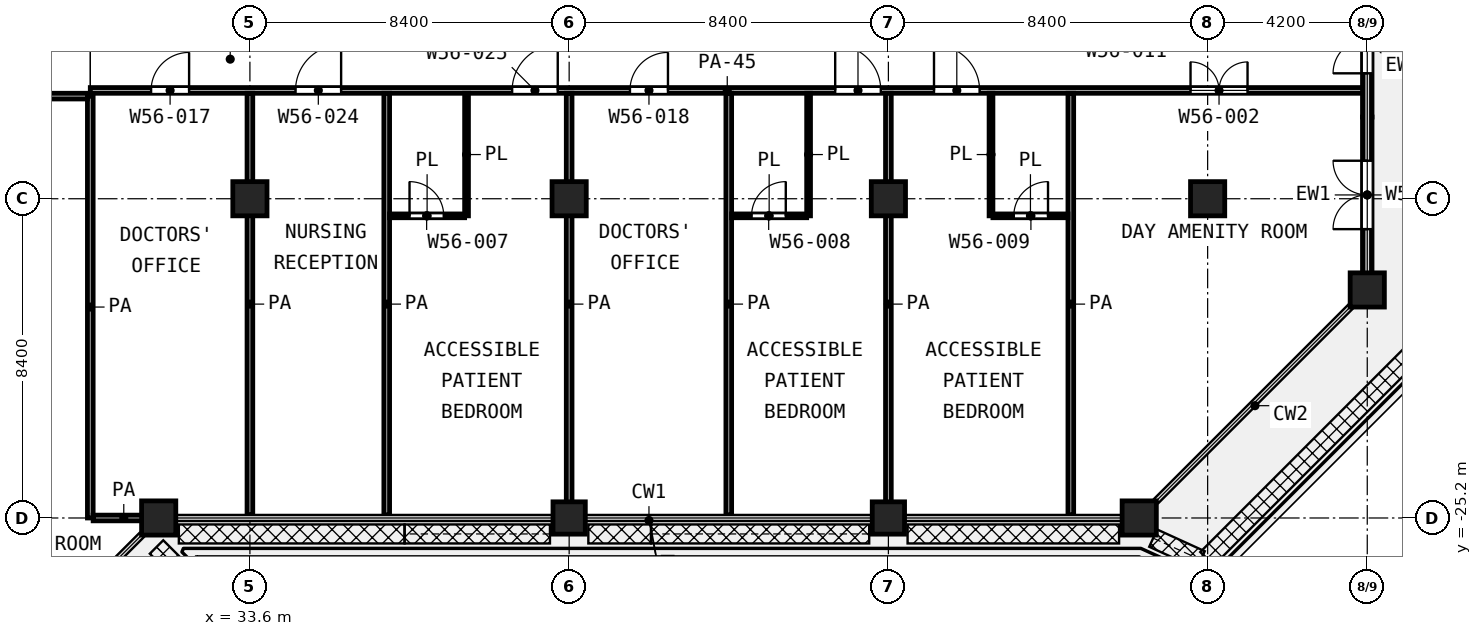
"""IFC4 building model, lengths in metres.
Left out: names, types, materials, properties, quantities, classifications, styles, units other than length and angle.
Written with IfcOpenShell. Run it as: python <this file> out.ifc"""

import sys

from ifc_helpers import new_model, si_unit, direction, frame, frame_2d, origin, origin_2d, place, context, subcontext, project, spatial, rectangle, extrude, element, fill, save


model = new_model("IFC4")
c1 = context("Model", 3, precision=1e-05, world=origin(), true_north=direction((0.0, 1.0)))
c2 = subcontext(c1, "Body", "Model", "MODEL_VIEW")
j1 = project(units=[si_unit("LENGTHUNIT", "METRE"), si_unit("PLANEANGLEUNIT", "RADIAN")], contexts=[c1])
p1 = place(None, origin())
s1 = spatial("IfcSite", under=j1, at=p1, CompositionType="ELEMENT")
p2 = place(p1, origin())
s2 = spatial("IfcBuilding", under=s1, at=p2, CompositionType="ELEMENT")
p3 = place(p2, frame((0.0, 0.0, 243.2)))
s3 = spatial("IfcBuildingStorey", under=s2, at=p3, CompositionType="ELEMENT", Elevation=243.2)
for number, where, z_axis, x_axis in (
    (1, (33.6, -16.8, 0.0), (0.0, 0.0, 1.0), (1.0, 0.0, 0.0)),
    (2, (42.0, -16.8, 0.0), (0.0, 0.0, 1.0), (1.0, 0.0, 0.0)),
    (3, (50.4, -16.8, 0.0), (0.0, 0.0, 1.0), (1.0, 0.0, 0.0)),
    (4, (58.8, -16.8, 0.0), (0.0, 0.0, 1.0), (1.0, 0.0, 0.0)),
    (5, (63.0, -19.2, 0.0), (0.0, 0.0, 1.0), (1.0, 0.0, 0.0)),
    (6, (31.2, -25.2, 0.0), (0.0, 0.0, 1.0), (1.0, 0.0, 0.0)),
):
    element("IfcColumn", number, at=place(p3, frame(where, z_axis=z_axis, x_axis=x_axis)), inside=s3, PredefinedType="COLUMN", context=c2, shape_type="SweptSolid", body=[
        extrude(rectangle(XDim=0.9, YDim=0.9, at=origin_2d()), origin(), (0.0, 0.0, 1.0), 4.2),
    ])
for number, where, z_axis, x_axis in (
    (7, (42.0, -25.2, 0.0), (0.0, 0.0, 1.0), (1.0, 0.0, 0.0)),
    (8, (50.4, -25.2, 0.0), (0.0, 0.0, 1.0), (1.0, 0.0, 0.0)),
):
    element("IfcColumn", number, at=place(p3, frame(where, z_axis=z_axis, x_axis=x_axis)), inside=s3, PredefinedType="COLUMN", context=c2, shape_type="SweptSolid", body=[
        extrude(rectangle(XDim=0.85, YDim=0.85, at=origin_2d()), origin(), (0.0, 0.0, 1.0), 4.2),
    ])
p4 = place(p3, frame((57.0, -25.2, 0.0), z_axis=(0.0, 0.0, 1.0), x_axis=(1.0, 0.0, 0.0)))
e9 = element("IfcColumn", 9, at=p4, inside=s3, PredefinedType="COLUMN", context=c2, shape_type="SweptSolid", body=[
    extrude(rectangle(XDim=0.9, YDim=0.9, at=origin_2d()), origin(), (0.0, 0.0, 1.0), 4.2),
])
p5 = place(p3, frame((63.0, -18.75, 0.0), z_axis=(0.0, 0.0, 1.0), x_axis=(0.0, 1.0, 0.0)))
e10 = element("IfcWall", 10, at=p5, inside=s3, PredefinedType="SOLIDWALL", context=c2, shape_type="SweptSolid", body=[
    extrude(rectangle(XDim=4.1, YDim=0.25, at=frame_2d((2.05, 0.0))), origin(), (0.0, 0.0, 1.0), 2.58),
])
p6 = place(p5, frame((1.15, 0.0, 0.0)))
e11 = element("IfcOpeningElement", 11, at=p6, cuts=e10, PredefinedType="OPENING", context=c2, shape_type="SweptSolid", body=[
    extrude(rectangle(XDim=1.8, YDim=2.1, at=frame_2d((0.9, 1.05))), frame((0.0, 0.135, 0.0), z_axis=(0.0, -1.0, 0.0), x_axis=(1.0, 0.0, 0.0)), (0.0, 0.0, 1.0), 0.27),
])
p7 = place(p3, frame((63.0, -14.65, 0.0), z_axis=(0.0, 0.0, 1.0), x_axis=(0.0, 1.0, 0.0)))
e12 = element("IfcWall", 12, at=p7, inside=s3, PredefinedType="SOLIDWALL", context=c2, shape_type="SweptSolid", body=[
    extrude(rectangle(XDim=4.1, YDim=0.25, at=frame_2d((2.05, 0.0))), origin(), (0.0, 0.0, 1.0), 2.58),
])
p8 = place(p7, frame((1.15, 0.0, 0.0)))
e13 = element("IfcOpeningElement", 13, at=p8, cuts=e12, PredefinedType="OPENING", context=c2, shape_type="SweptSolid", body=[
    extrude(rectangle(XDim=1.8, YDim=2.1, at=frame_2d((0.9, 1.05))), frame((0.0, 0.135, 0.0), z_axis=(0.0, -1.0, 0.0), x_axis=(1.0, 0.0, 0.0)), (0.0, 0.0, 1.0), 0.27),
])
p9 = place(p3, frame((37.275, -17.25, 0.0), z_axis=(0.0, 0.0, 1.0), x_axis=(1.0, 0.0, 0.0)))
e14 = element("IfcWall", 14, at=p9, inside=s3, PredefinedType="PARTITIONING", context=c2, shape_type="SweptSolid", body=[
    extrude(rectangle(XDim=1.975, YDim=0.1, at=frame_2d((0.988, 0.0))), origin(), (0.0, 0.0, 1.0), 3.6),
])
p10 = place(p9, frame((0.525, 0.0, 0.0)))
e15 = element("IfcOpeningElement", 15, at=p10, cuts=e14, PredefinedType="OPENING", context=c2, shape_type="SweptSolid", body=[
    extrude(rectangle(XDim=0.9, YDim=2.1, at=frame_2d((0.45, 1.05))), frame((0.0, 0.06, 0.0), z_axis=(0.0, -1.0, 0.0), x_axis=(1.0, 0.0, 0.0)), (0.0, 0.0, 1.0), 0.12),
])
p11 = place(p3, frame((46.275, -17.25, 0.0), z_axis=(0.0, 0.0, 1.0), x_axis=(1.0, 0.0, 0.0)))
e16 = element("IfcWall", 16, at=p11, inside=s3, PredefinedType="PARTITIONING", context=c2, shape_type="SweptSolid", body=[
    extrude(rectangle(XDim=1.975, YDim=0.1, at=frame_2d((0.988, 0.0))), origin(), (0.0, 0.0, 1.0), 3.6),
])
p12 = place(p11, frame((0.525, 0.0, 0.0)))
e17 = element("IfcOpeningElement", 17, at=p12, cuts=e16, PredefinedType="OPENING", context=c2, shape_type="SweptSolid", body=[
    extrude(rectangle(XDim=0.9, YDim=2.1, at=frame_2d((0.45, 1.05))), frame((0.0, 0.06, 0.0), z_axis=(0.0, -1.0, 0.0), x_axis=(1.0, 0.0, 0.0)), (0.0, 0.0, 1.0), 0.12),
])
p13 = place(p3, frame((53.15, -17.25, 0.0), z_axis=(0.0, 0.0, 1.0), x_axis=(1.0, 0.0, 0.0)))
e18 = element("IfcWall", 18, at=p13, inside=s3, PredefinedType="PARTITIONING", context=c2, shape_type="SweptSolid", body=[
    extrude(rectangle(XDim=1.975, YDim=0.1, at=frame_2d((0.988, 0.0))), origin(), (0.0, 0.0, 1.0), 3.6),
])
p14 = place(p13, frame((0.55, 0.0, 0.0)))
e19 = element("IfcOpeningElement", 19, at=p14, cuts=e18, PredefinedType="OPENING", context=c2, shape_type="SweptSolid", body=[
    extrude(rectangle(XDim=0.9, YDim=2.1, at=frame_2d((0.45, 1.05))), frame((0.0, 0.06, 0.0), z_axis=(0.0, -1.0, 0.0), x_axis=(1.0, 0.0, 0.0)), (0.0, 0.0, 1.0), 0.12),
])
for number, where, z_axis, x_axis in (
    (20, (39.3, -17.25, 0.0), (0.0, 0.0, 1.0), (0.0, 1.0, 0.0)),
    (21, (48.3, -17.25, 0.0), (0.0, 0.0, 1.0), (0.0, 1.0, 0.0)),
    (22, (53.1, -17.25, 0.0), (0.0, 0.0, 1.0), (0.0, 1.0, 0.0)),
):
    element("IfcWall", number, at=place(p3, frame(where, z_axis=z_axis, x_axis=x_axis)), inside=s3, PredefinedType="PARTITIONING", context=c2, shape_type="SweptSolid", body=[
        extrude(rectangle(XDim=3.225, YDim=0.1, at=frame_2d((1.613, 0.0))), origin(), (0.0, 0.0, 1.0), 3.6),
    ])
p15 = place(p3, frame((29.475, -25.2, 0.0), z_axis=(0.0, 0.0, 1.0), x_axis=(1.0, 0.0, 0.0)))
e23 = element("IfcWall", 23, at=p15, inside=s3, PredefinedType="PARTITIONING", context=c2, shape_type="SweptSolid", body=[
    extrude(rectangle(XDim=1.612, YDim=0.15, at=frame_2d((0.806, 0.0))), origin(), (0.0, 0.0, 1.0), 3.6),
])
p16 = place(p3, frame((24.8, -14.1, 0.0), z_axis=(0.0, 0.0, 1.0), x_axis=(1.0, 0.0, 0.0)))
e24 = element("IfcWall", 24, at=p16, inside=s3, PredefinedType="PARTITIONING", context=c2, shape_type="SweptSolid", body=[
    extrude(rectangle(XDim=4.525, YDim=0.15, at=frame_2d((2.262, 0.0))), origin(), (0.0, 0.0, 1.0), 3.6),
])
p17 = place(p16, frame((1.75, 0.0, 0.0)))
e25 = element("IfcOpeningElement", 25, at=p17, cuts=e24, PredefinedType="OPENING", context=c2, shape_type="SweptSolid", body=[
    extrude(rectangle(XDim=1.5, YDim=2.1, at=frame_2d((0.75, 1.05))), frame((0.0, 0.085, 0.0), z_axis=(0.0, -1.0, 0.0), x_axis=(1.0, 0.0, 0.0)), (0.0, 0.0, 1.0), 0.17),
])
p18 = place(p3, frame((29.4, -13.95, 0.0), z_axis=(0.0, 0.0, 1.0), x_axis=(1.0, 0.0, 0.0)))
e26 = element("IfcWall", 26, at=p18, inside=s3, PredefinedType="PARTITIONING", context=c2, shape_type="SweptSolid", body=[
    extrude(rectangle(XDim=33.52, YDim=0.15, at=frame_2d((16.76, 0.0))), origin(), (0.0, 0.0, 1.0), 2.7),
])
p19 = place(p18, frame((1.6, 0.0, 0.0)))
e27 = element("IfcOpeningElement", 27, at=p19, cuts=e26, PredefinedType="OPENING", context=c2, shape_type="SweptSolid", body=[
    extrude(rectangle(XDim=1.0, YDim=2.1, at=frame_2d((0.5, 1.05))), frame((0.0, 0.085, 0.0), z_axis=(0.0, -1.0, 0.0), x_axis=(1.0, 0.0, 0.0)), (0.0, 0.0, 1.0), 0.17),
])
p20 = place(p18, frame((5.4, 0.0, 0.0)))
e28 = element("IfcOpeningElement", 28, at=p20, cuts=e26, PredefinedType="OPENING", context=c2, shape_type="SweptSolid", body=[
    extrude(rectangle(XDim=1.2, YDim=2.1, at=frame_2d((0.6, 1.05))), frame((0.0, 0.085, 0.0), z_axis=(0.0, -1.0, 0.0), x_axis=(1.0, 0.0, 0.0)), (0.0, 0.0, 1.0), 0.17),
])
p21 = place(p18, frame((11.1, 0.0, 0.0)))
e29 = element("IfcOpeningElement", 29, at=p21, cuts=e26, PredefinedType="OPENING", context=c2, shape_type="SweptSolid", body=[
    extrude(rectangle(XDim=1.2, YDim=2.1, at=frame_2d((0.6, 1.05))), frame((0.0, 0.085, 0.0), z_axis=(0.0, -1.0, 0.0), x_axis=(1.0, 0.0, 0.0)), (0.0, 0.0, 1.0), 0.17),
])
p22 = place(p18, frame((14.2, 0.0, 0.0)))
e30 = element("IfcOpeningElement", 30, at=p22, cuts=e26, PredefinedType="OPENING", context=c2, shape_type="SweptSolid", body=[
    extrude(rectangle(XDim=1.0, YDim=2.1, at=frame_2d((0.5, 1.05))), frame((0.0, 0.085, 0.0), z_axis=(0.0, -1.0, 0.0), x_axis=(1.0, 0.0, 0.0)), (0.0, 0.0, 1.0), 0.17),
])
p23 = place(p18, frame((19.6, 0.0, 0.0)))
e31 = element("IfcOpeningElement", 31, at=p23, cuts=e26, PredefinedType="OPENING", context=c2, shape_type="SweptSolid", body=[
    extrude(rectangle(XDim=1.2, YDim=2.1, at=frame_2d((0.6, 1.05))), frame((0.0, 0.085, 0.0), z_axis=(0.0, -1.0, 0.0), x_axis=(1.0, 0.0, 0.0)), (0.0, 0.0, 1.0), 0.17),
])
p24 = place(p18, frame((22.2, 0.0, 0.0)))
e32 = element("IfcOpeningElement", 32, at=p24, cuts=e26, PredefinedType="OPENING", context=c2, shape_type="SweptSolid", body=[
    extrude(rectangle(XDim=1.2, YDim=2.1, at=frame_2d((0.6, 1.05))), frame((0.0, 0.085, 0.0), z_axis=(0.0, -1.0, 0.0), x_axis=(1.0, 0.0, 0.0)), (0.0, 0.0, 1.0), 0.17),
])
p25 = place(p18, frame((28.95, 0.0, 0.0)))
e33 = element("IfcOpeningElement", 33, at=p25, cuts=e26, PredefinedType="OPENING", context=c2, shape_type="SweptSolid", body=[
    extrude(rectangle(XDim=1.5, YDim=2.1, at=frame_2d((0.75, 1.05))), frame((0.0, 0.085, 0.0), z_axis=(0.0, -1.0, 0.0), x_axis=(1.0, 0.0, 0.0)), (0.0, 0.0, 1.0), 0.17),
])
p26 = place(p3, frame((29.4, -25.2, 0.0), z_axis=(0.0, 0.0, 1.0), x_axis=(0.0, 1.0, 0.0)))
e34 = element("IfcWall", 34, at=p26, inside=s3, PredefinedType="PARTITIONING", context=c2, shape_type="SweptSolid", body=[
    extrude(rectangle(XDim=11.1, YDim=0.15, at=frame_2d((5.55, 0.0))), origin(), (0.0, 0.0, 1.0), 3.6),
])
for number, where, z_axis, x_axis in (
    (35, (33.6, -25.12, 0.0), (0.0, 0.0, 1.0), (0.0, 1.0, 0.0)),
    (36, (37.2, -25.12, 0.0), (0.0, 0.0, 1.0), (0.0, 1.0, 0.0)),
    (37, (42.0, -25.12, 0.0), (0.0, 0.0, 1.0), (0.0, 1.0, 0.0)),
    (38, (46.2, -25.12, 0.0), (0.0, 0.0, 1.0), (0.0, 1.0, 0.0)),
    (39, (50.4, -25.12, 0.0), (0.0, 0.0, 1.0), (0.0, 1.0, 0.0)),
    (40, (55.2, -25.12, 0.0), (0.0, 0.0, 1.0), (0.0, 1.0, 0.0)),
):
    element("IfcWall", number, at=place(p3, frame(where, z_axis=z_axis, x_axis=x_axis)), inside=s3, PredefinedType="PARTITIONING", context=c2, shape_type="SweptSolid", body=[
        extrude(rectangle(XDim=11.095, YDim=0.15, at=frame_2d((5.548, 0.0))), origin(), (0.0, 0.0, 1.0), 3.6),
    ])
p27 = place(p6, origin())
e41 = element("IfcDoor", 41, at=p27, inside=s3, OperationType="DOUBLE_DOOR_SINGLE_SWING", PredefinedType="DOOR", context=c2, shape_type="SweptSolid", body=[
    extrude(rectangle(XDim=1.8, YDim=2.1, at=frame_2d((0.9, 1.05))), frame((0.0, 0.025, 0.0), z_axis=(0.0, -1.0, 0.0), x_axis=(1.0, 0.0, 0.0)), (0.0, 0.0, 1.0), 0.05),
])
fill(e11, e41)
p28 = place(p8, origin())
e42 = element("IfcDoor", 42, at=p28, inside=s3, OperationType="DOUBLE_DOOR_SINGLE_SWING", PredefinedType="DOOR", context=c2, shape_type="SweptSolid", body=[
    extrude(rectangle(XDim=1.8, YDim=2.1, at=frame_2d((0.9, 1.05))), frame((0.0, 0.025, 0.0), z_axis=(0.0, -1.0, 0.0), x_axis=(1.0, 0.0, 0.0)), (0.0, 0.0, 1.0), 0.05),
])
fill(e13, e42)
p29 = place(p19, origin())
e43 = element("IfcDoor", 43, at=p29, inside=s3, OperationType="SINGLE_SWING_RIGHT", PredefinedType="DOOR", context=c2, shape_type="SweptSolid", body=[
    extrude(rectangle(XDim=1.0, YDim=2.1, at=frame_2d((0.5, 1.05))), frame((0.0, 0.025, 0.0), z_axis=(0.0, -1.0, 0.0), x_axis=(1.0, 0.0, 0.0)), (0.0, 0.0, 1.0), 0.05),
])
fill(e27, e43)
p30 = place(p20, origin())
e44 = element("IfcDoor", 44, at=p30, inside=s3, OperationType="SINGLE_SWING_RIGHT", PredefinedType="DOOR", context=c2, shape_type="SweptSolid", body=[
    extrude(rectangle(XDim=1.2, YDim=2.1, at=frame_2d((0.6, 1.05))), frame((0.0, 0.025, 0.0), z_axis=(0.0, -1.0, 0.0), x_axis=(1.0, 0.0, 0.0)), (0.0, 0.0, 1.0), 0.05),
])
fill(e28, e44)
p31 = place(p21, origin())
e45 = element("IfcDoor", 45, at=p31, inside=s3, OperationType="SINGLE_SWING_RIGHT", PredefinedType="DOOR", context=c2, shape_type="SweptSolid", body=[
    extrude(rectangle(XDim=1.2, YDim=2.1, at=frame_2d((0.6, 1.05))), frame((0.0, 0.025, 0.0), z_axis=(0.0, -1.0, 0.0), x_axis=(1.0, 0.0, 0.0)), (0.0, 0.0, 1.0), 0.05),
])
fill(e29, e45)
p32 = place(p10, origin())
e46 = element("IfcDoor", 46, at=p32, inside=s3, OperationType="SINGLE_SWING_LEFT", PredefinedType="DOOR", context=c2, shape_type="SweptSolid", body=[
    extrude(rectangle(XDim=0.9, YDim=2.1, at=frame_2d((0.45, 1.05))), frame((0.0, 0.025, 0.0), z_axis=(0.0, -1.0, 0.0), x_axis=(1.0, 0.0, 0.0)), (0.0, 0.0, 1.0), 0.05),
])
fill(e15, e46)
p33 = place(p22, origin())
e47 = element("IfcDoor", 47, at=p33, inside=s3, OperationType="SINGLE_SWING_RIGHT", PredefinedType="DOOR", context=c2, shape_type="SweptSolid", body=[
    extrude(rectangle(XDim=1.0, YDim=2.1, at=frame_2d((0.5, 1.05))), frame((0.0, 0.025, 0.0), z_axis=(0.0, -1.0, 0.0), x_axis=(1.0, 0.0, 0.0)), (0.0, 0.0, 1.0), 0.05),
])
fill(e30, e47)
p34 = place(p23, origin())
e48 = element("IfcDoor", 48, at=p34, inside=s3, OperationType="SINGLE_SWING_LEFT", PredefinedType="DOOR", context=c2, shape_type="SweptSolid", body=[
    extrude(rectangle(XDim=1.2, YDim=2.1, at=frame_2d((0.6, 1.05))), frame((0.0, 0.025, 0.0), z_axis=(0.0, -1.0, 0.0), x_axis=(1.0, 0.0, 0.0)), (0.0, 0.0, 1.0), 0.05),
])
fill(e31, e48)
p35 = place(p12, origin())
e49 = element("IfcDoor", 49, at=p35, inside=s3, OperationType="SINGLE_SWING_RIGHT", PredefinedType="DOOR", context=c2, shape_type="SweptSolid", body=[
    extrude(rectangle(XDim=0.9, YDim=2.1, at=frame_2d((0.45, 1.05))), frame((0.0, 0.025, 0.0), z_axis=(0.0, -1.0, 0.0), x_axis=(1.0, 0.0, 0.0)), (0.0, 0.0, 1.0), 0.05),
])
fill(e17, e49)
p36 = place(p24, origin())
e50 = element("IfcDoor", 50, at=p36, inside=s3, OperationType="SINGLE_SWING_LEFT", PredefinedType="DOOR", context=c2, shape_type="SweptSolid", body=[
    extrude(rectangle(XDim=1.2, YDim=2.1, at=frame_2d((0.6, 1.05))), frame((0.0, 0.025, 0.0), z_axis=(0.0, -1.0, 0.0), x_axis=(1.0, 0.0, 0.0)), (0.0, 0.0, 1.0), 0.05),
])
fill(e32, e50)
p37 = place(p14, origin())
e51 = element("IfcDoor", 51, at=p37, inside=s3, OperationType="SINGLE_SWING_RIGHT", PredefinedType="DOOR", context=c2, shape_type="SweptSolid", body=[
    extrude(rectangle(XDim=0.9, YDim=2.1, at=frame_2d((0.45, 1.05))), frame((0.0, 0.025, 0.0), z_axis=(0.0, -1.0, 0.0), x_axis=(1.0, 0.0, 0.0)), (0.0, 0.0, 1.0), 0.05),
])
fill(e19, e51)
p38 = place(p25, origin())
e52 = element("IfcDoor", 52, at=p38, inside=s3, OperationType="DOUBLE_DOOR_SINGLE_SWING", PredefinedType="DOOR", context=c2, shape_type="SweptSolid", body=[
    extrude(rectangle(XDim=1.5, YDim=2.1, at=frame_2d((0.75, 1.05))), frame((0.0, 0.025, 0.0), z_axis=(0.0, -1.0, 0.0), x_axis=(1.0, 0.0, 0.0)), (0.0, 0.0, 1.0), 0.05),
])
fill(e33, e52)
save(model, sys.argv[1])
